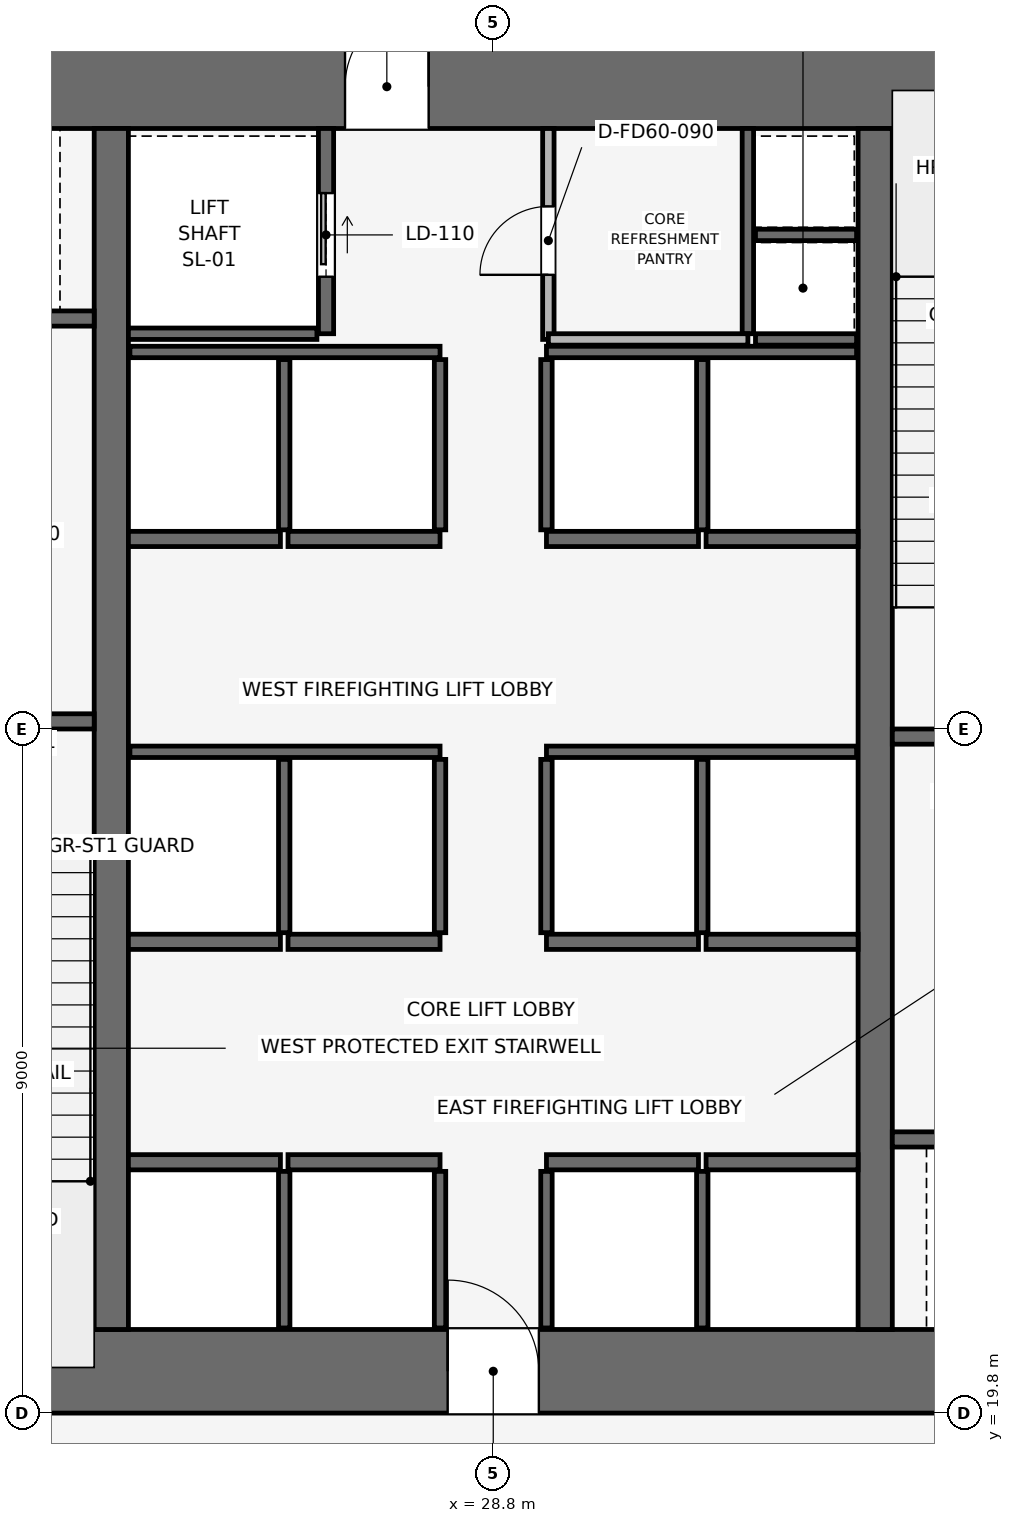
"""IFC4 building model, lengths in metres.
Left out: names, types, materials, properties, quantities, classifications, styles, units other than length and angle.
Written with IfcOpenShell. Run it as: python <this file> out.ifc"""

import sys

from ifc_helpers import new_model, si_unit, direction, frame, frame_2d, origin, place, context, subcontext, project, spatial, rectangle, extrude, element, fill, save


model = new_model("IFC4")
c1 = context("Model", 3, precision=1e-05, world=origin(), true_north=direction((0.0, 1.0)))
c2 = subcontext(c1, "Body", "Model", "MODEL_VIEW")
j1 = project(units=[si_unit("LENGTHUNIT", "METRE"), si_unit("PLANEANGLEUNIT", "RADIAN")], contexts=[c1])
p1 = place(None, origin())
s1 = spatial("IfcSite", under=j1, at=p1, CompositionType="ELEMENT")
p2 = place(p1, origin())
s2 = spatial("IfcBuilding", under=s1, at=p2, CompositionType="ELEMENT")
p3 = place(p2, frame((0.0, 0.0, 8.4)))
s3 = spatial("IfcBuildingStorey", under=s2, at=p3, CompositionType="ELEMENT", Elevation=8.4)
p4 = place(p3, frame((19.8, 20.35, 0.0), z_axis=(0.0, 0.0, 1.0), x_axis=(1.0, 0.0, 0.0)))
e1 = element("IfcWall", 1, at=p4, inside=s3, PredefinedType="SHEAR", context=c2, shape_type="SweptSolid", body=[
    extrude(rectangle(XDim=18.0, YDim=1.1, at=frame_2d((9.0, 0.0))), origin(), (0.0, 0.0, 1.0), 5.4),
])
p5 = place(p4, frame((8.4, 0.0, 0.0)))
e2 = element("IfcOpeningElement", 2, at=p5, cuts=e1, PredefinedType="OPENING", context=c2, shape_type="SweptSolid", body=[
    extrude(rectangle(XDim=1.2, YDim=2.2, at=frame_2d((0.6, 1.1))), frame((0.0, 0.56, 0.0), z_axis=(0.0, -1.0, 0.0), x_axis=(1.0, 0.0, 0.0)), (0.0, 0.0, 1.0), 1.12),
])
p6 = place(p3, frame((19.8, 37.25, 0.0), z_axis=(0.0, 0.0, 1.0), x_axis=(1.0, 0.0, 0.0)))
e3 = element("IfcWall", 3, at=p6, inside=s3, PredefinedType="SHEAR", context=c2, shape_type="SweptSolid", body=[
    extrude(rectangle(XDim=18.0, YDim=1.1, at=frame_2d((9.0, 0.0))), origin(), (0.0, 0.0, 1.0), 5.4),
])
p7 = place(p6, frame((7.05, 0.0, 0.0)))
e4 = element("IfcOpeningElement", 4, at=p7, cuts=e3, PredefinedType="OPENING", context=c2, shape_type="SweptSolid", body=[
    extrude(rectangle(XDim=1.1, YDim=2.15, at=frame_2d((0.55, 1.075))), frame((0.0, 0.56, 0.0), z_axis=(0.0, -1.0, 0.0), x_axis=(1.0, 0.0, 0.0)), (0.0, 0.0, 1.0), 1.12),
])
for number, where, z_axis, x_axis in (
    (5, (23.775, 20.9, 0.0), (0.0, 0.0, 1.0), (0.0, 1.0, 0.0)),
    (6, (33.825, 20.9, 0.0), (0.0, 0.0, 1.0), (0.0, 1.0, 0.0)),
):
    element("IfcWall", number, at=place(p3, frame(where, z_axis=z_axis, x_axis=x_axis)), inside=s3, PredefinedType="SHEAR", context=c2, shape_type="SweptSolid", body=[
        extrude(rectangle(XDim=15.8, YDim=0.45, at=frame_2d((7.9, 0.0))), origin(), (0.0, 0.0, 1.0), 5.4),
    ])
p8 = place(p3, frame((20.4, 28.9, 0.0), z_axis=(0.0, 0.0, 1.0), x_axis=(1.0, 0.0, 0.0)))
e7 = element("IfcWall", 7, at=p8, inside=s3, PredefinedType="SHEAR", context=c2, shape_type="SweptSolid", body=[
    extrude(rectangle(XDim=3.15, YDim=0.2, at=frame_2d((1.575, 0.0))), origin(), (0.0, 0.0, 1.0), 5.05),
])
p9 = place(p8, frame((0.8, 0.0, 0.0)))
e8 = element("IfcOpeningElement", 8, at=p9, cuts=e7, PredefinedType="OPENING", context=c2, shape_type="SweptSolid", body=[
    extrude(rectangle(XDim=1.0, YDim=2.1, at=frame_2d((0.5, 1.05))), frame((0.0, 0.11, 0.0), z_axis=(0.0, -1.0, 0.0), x_axis=(1.0, 0.0, 0.0)), (0.0, 0.0, 1.0), 0.22),
])
p10 = place(p3, frame((34.05, 28.7, 0.0), z_axis=(0.0, 0.0, 1.0), x_axis=(1.0, 0.0, 0.0)))
e9 = element("IfcWall", 9, at=p10, inside=s3, PredefinedType="SHEAR", context=c2, shape_type="SweptSolid", body=[
    extrude(rectangle(XDim=3.15, YDim=0.2, at=frame_2d((1.575, 0.0))), origin(), (0.0, 0.0, 1.0), 5.05),
])
p11 = place(p10, frame((0.8, 0.0, 0.0)))
e10 = element("IfcOpeningElement", 10, at=p11, cuts=e9, PredefinedType="OPENING", context=c2, shape_type="SweptSolid", body=[
    extrude(rectangle(XDim=1.0, YDim=2.1, at=frame_2d((0.5, 1.05))), frame((0.0, 0.11, 0.0), z_axis=(0.0, -1.0, 0.0), x_axis=(1.0, 0.0, 0.0)), (0.0, 0.0, 1.0), 0.22),
])
p12 = place(p3, frame((32.15, 34.0, 0.0), z_axis=(0.0, 0.0, 1.0), x_axis=(0.0, 1.0, 0.0)))
e11 = element("IfcWall", 11, at=p12, inside=s3, PredefinedType="SHEAR", context=c2, shape_type="SweptSolid", body=[
    extrude(rectangle(XDim=2.7, YDim=0.15, at=frame_2d((1.35, 0.0))), origin(), (0.0, 0.0, 1.0), 5.05),
])
for number, where, z_axis, x_axis in (
    (12, (32.25, 33.925, 0.0), (0.0, 0.0, 1.0), (1.0, 0.0, 0.0)),
    (13, (32.25, 35.3, 0.0), (0.0, 0.0, 1.0), (1.0, 0.0, 0.0)),
):
    element("IfcWall", number, at=place(p3, frame(where, z_axis=z_axis, x_axis=x_axis)), inside=s3, PredefinedType="SHEAR", context=c2, shape_type="SweptSolid", body=[
        extrude(rectangle(XDim=1.33, YDim=0.15, at=frame_2d((0.665, 0.0))), origin(), (0.0, 0.0, 1.0), 5.05),
    ])
p13 = place(p3, frame((20.5, 34.2, 0.0), z_axis=(0.0, 0.0, 1.0), x_axis=(1.0, 0.0, 0.0)))
e14 = element("IfcWall", 14, at=p13, inside=s3, PredefinedType="SHEAR", context=c2, shape_type="SweptSolid", body=[
    extrude(rectangle(XDim=3.05, YDim=0.2, at=frame_2d((1.525, 0.0))), origin(), (0.0, 0.0, 1.0), 5.05),
])
p14 = place(p13, frame((0.75, 0.0, 0.0)))
e15 = element("IfcOpeningElement", 15, at=p14, cuts=e14, PredefinedType="OPENING", context=c2, shape_type="SweptSolid", body=[
    extrude(rectangle(XDim=1.1, YDim=2.15, at=frame_2d((0.55, 1.075))), frame((0.0, 0.11, 0.0), z_axis=(0.0, -1.0, 0.0), x_axis=(1.0, 0.0, 0.0)), (0.0, 0.0, 1.0), 0.22),
])
p15 = place(p3, frame((34.05, 23.4, 0.0), z_axis=(0.0, 0.0, 1.0), x_axis=(1.0, 0.0, 0.0)))
e16 = element("IfcWall", 16, at=p15, inside=s3, PredefinedType="SHEAR", context=c2, shape_type="SweptSolid", body=[
    extrude(rectangle(XDim=3.05, YDim=0.2, at=frame_2d((1.525, 0.0))), origin(), (0.0, 0.0, 1.0), 5.05),
])
p16 = place(p15, frame((1.2, 0.0, 0.0)))
e17 = element("IfcOpeningElement", 17, at=p16, cuts=e16, PredefinedType="OPENING", context=c2, shape_type="SweptSolid", body=[
    extrude(rectangle(XDim=1.1, YDim=2.15, at=frame_2d((0.55, 1.075))), frame((0.0, 0.11, 0.0), z_axis=(0.0, -1.0, 0.0), x_axis=(1.0, 0.0, 0.0)), (0.0, 0.0, 1.0), 0.22),
])
p17 = place(p3, frame((26.6, 34.0, 0.0), z_axis=(0.0, 0.0, 1.0), x_axis=(0.0, 1.0, 0.0)))
e18 = element("IfcWall", 18, at=p17, inside=s3, PredefinedType="SHEAR", context=c2, shape_type="SweptSolid", body=[
    extrude(rectangle(XDim=2.7, YDim=0.2, at=frame_2d((1.35, 0.0))), origin(), (0.0, 0.0, 1.0), 5.05),
])
p18 = place(p17, frame((0.75, 0.0, 0.0)))
e19 = element("IfcOpeningElement", 19, at=p18, cuts=e18, PredefinedType="OPENING", context=c2, shape_type="SweptSolid", body=[
    extrude(rectangle(XDim=1.1, YDim=2.15, at=frame_2d((0.55, 1.075))), frame((0.0, 0.11, 0.0), z_axis=(0.0, -1.0, 0.0), x_axis=(1.0, 0.0, 0.0)), (0.0, 0.0, 1.0), 0.22),
])
p19 = place(p3, frame((24.0, 34.0, 0.0), z_axis=(0.0, 0.0, 1.0), x_axis=(1.0, 0.0, 0.0)))
e20 = element("IfcWall", 20, at=p19, inside=s3, PredefinedType="SHEAR", context=c2, shape_type="SweptSolid", body=[
    extrude(rectangle(XDim=2.48, YDim=0.15, at=frame_2d((1.24, 0.0))), origin(), (0.0, 0.0, 1.0), 5.05),
])
for number, where, z_axis, x_axis in (
    (21, (24.0, 23.1, 0.0), (0.0, 0.0, 1.0), (1.0, 0.0, 0.0)),
    (22, (26.1, 23.1, 0.0), (0.0, 0.0, 1.0), (1.0, 0.0, 0.0)),
    (23, (29.5, 23.1, 0.0), (0.0, 0.0, 1.0), (1.0, 0.0, 0.0)),
    (24, (31.6, 23.1, 0.0), (0.0, 0.0, 1.0), (1.0, 0.0, 0.0)),
    (25, (24.0, 26.0, 0.0), (0.0, 0.0, 1.0), (1.0, 0.0, 0.0)),
    (26, (26.1, 26.0, 0.0), (0.0, 0.0, 1.0), (1.0, 0.0, 0.0)),
    (27, (29.5, 26.0, 0.0), (0.0, 0.0, 1.0), (1.0, 0.0, 0.0)),
    (28, (31.6, 26.0, 0.0), (0.0, 0.0, 1.0), (1.0, 0.0, 0.0)),
    (29, (24.0, 31.3, 0.0), (0.0, 0.0, 1.0), (1.0, 0.0, 0.0)),
    (30, (26.1, 31.3, 0.0), (0.0, 0.0, 1.0), (1.0, 0.0, 0.0)),
    (31, (29.5, 31.3, 0.0), (0.0, 0.0, 1.0), (1.0, 0.0, 0.0)),
    (32, (31.6, 31.3, 0.0), (0.0, 0.0, 1.0), (1.0, 0.0, 0.0)),
):
    element("IfcWall", number, at=place(p3, frame(where, z_axis=z_axis, x_axis=x_axis)), inside=s3, PredefinedType="SHEAR", context=c2, shape_type="SweptSolid", body=[
        extrude(rectangle(XDim=2.0, YDim=0.2, at=frame_2d((1.0, 0.0))), origin(), (0.0, 0.0, 1.0), 5.05),
    ])
for number, where, z_axis, x_axis in (
    (33, (26.05, 20.92, 0.0), (0.0, 0.0, 1.0), (0.0, 1.0, 0.0)),
    (34, (28.1, 20.92, 0.0), (0.0, 0.0, 1.0), (0.0, 1.0, 0.0)),
    (35, (29.5, 20.92, 0.0), (0.0, 0.0, 1.0), (0.0, 1.0, 0.0)),
    (36, (31.55, 20.92, 0.0), (0.0, 0.0, 1.0), (0.0, 1.0, 0.0)),
):
    element("IfcWall", number, at=place(p3, frame(where, z_axis=z_axis, x_axis=x_axis)), inside=s3, PredefinedType="SHEAR", context=c2, shape_type="SweptSolid", body=[
        extrude(rectangle(XDim=2.06, YDim=0.15, at=frame_2d((1.03, 0.0))), origin(), (0.0, 0.0, 1.0), 5.05),
    ])
for number, where, z_axis, x_axis in (
    (37, (24.02, 28.5, 0.0), (0.0, 0.0, 1.0), (1.0, 0.0, 0.0)),
    (38, (29.5, 28.5, 0.0), (0.0, 0.0, 1.0), (1.0, 0.0, 0.0)),
):
    element("IfcWall", number, at=place(p3, frame(where, z_axis=z_axis, x_axis=x_axis)), inside=s3, PredefinedType="SHEAR", context=c2, shape_type="SweptSolid", body=[
        extrude(rectangle(XDim=4.08, YDim=0.15, at=frame_2d((2.04, 0.0))), origin(), (0.0, 0.0, 1.0), 5.05),
    ])
for number, where, z_axis, x_axis in (
    (39, (26.05, 26.12, 0.0), (0.0, 0.0, 1.0), (0.0, 1.0, 0.0)),
    (40, (28.1, 26.12, 0.0), (0.0, 0.0, 1.0), (0.0, 1.0, 0.0)),
    (41, (29.5, 26.12, 0.0), (0.0, 0.0, 1.0), (0.0, 1.0, 0.0)),
    (42, (31.55, 26.12, 0.0), (0.0, 0.0, 1.0), (0.0, 1.0, 0.0)),
):
    element("IfcWall", number, at=place(p3, frame(where, z_axis=z_axis, x_axis=x_axis)), inside=s3, PredefinedType="SHEAR", context=c2, shape_type="SweptSolid", body=[
        extrude(rectangle(XDim=2.28, YDim=0.15, at=frame_2d((1.14, 0.0))), origin(), (0.0, 0.0, 1.0), 5.05),
    ])
for number, where, z_axis, x_axis in (
    (43, (24.02, 33.76, 0.0), (0.0, 0.0, 1.0), (1.0, 0.0, 0.0)),
    (44, (29.5, 33.76, 0.0), (0.0, 0.0, 1.0), (1.0, 0.0, 0.0)),
):
    element("IfcWall", number, at=place(p3, frame(where, z_axis=z_axis, x_axis=x_axis)), inside=s3, PredefinedType="SHEAR", context=c2, shape_type="SweptSolid", body=[
        extrude(rectangle(XDim=4.08, YDim=0.15, at=frame_2d((2.04, 0.0))), origin(), (0.0, 0.0, 1.0), 5.05),
    ])
for number, where, z_axis, x_axis in (
    (45, (26.05, 31.42, 0.0), (0.0, 0.0, 1.0), (0.0, 1.0, 0.0)),
    (46, (28.1, 31.42, 0.0), (0.0, 0.0, 1.0), (0.0, 1.0, 0.0)),
    (47, (29.5, 31.42, 0.0), (0.0, 0.0, 1.0), (0.0, 1.0, 0.0)),
    (48, (31.55, 31.42, 0.0), (0.0, 0.0, 1.0), (0.0, 1.0, 0.0)),
):
    element("IfcWall", number, at=place(p3, frame(where, z_axis=z_axis, x_axis=x_axis)), inside=s3, PredefinedType="SHEAR", context=c2, shape_type="SweptSolid", body=[
        extrude(rectangle(XDim=2.24, YDim=0.15, at=frame_2d((1.12, 0.0))), origin(), (0.0, 0.0, 1.0), 5.05),
    ])
p20 = place(p3, frame((29.525, 33.925, 0.0), z_axis=(0.0, 0.0, 1.0), x_axis=(0.0, 1.0, 0.0)))
e49 = element("IfcWall", 49, at=p20, inside=s3, PredefinedType="PARTITIONING", context=c2, shape_type="SweptSolid", body=[
    extrude(rectangle(XDim=2.775, YDim=0.15, at=frame_2d((1.387, 0.0))), origin(), (0.0, 0.0, 1.0), 5.05),
])
p21 = place(p20, frame((0.85, 0.0, 0.0)))
e50 = element("IfcOpeningElement", 50, at=p21, cuts=e49, PredefinedType="OPENING", context=c2, shape_type="SweptSolid", body=[
    extrude(rectangle(XDim=0.9, YDim=2.1, at=frame_2d((0.45, 1.05))), frame((0.0, 0.085, 0.0), z_axis=(0.0, -1.0, 0.0), x_axis=(1.0, 0.0, 0.0)), (0.0, 0.0, 1.0), 0.17),
])
p22 = place(p3, frame((29.525, 33.925, 0.0), z_axis=(0.0, 0.0, 1.0), x_axis=(1.0, 0.0, 0.0)))
e51 = element("IfcWall", 51, at=p22, inside=s3, PredefinedType="PARTITIONING", context=c2, shape_type="SweptSolid", body=[
    extrude(rectangle(XDim=2.625, YDim=0.15, at=frame_2d((1.312, 0.0))), origin(), (0.0, 0.0, 1.0), 5.05),
])
p23 = place(p18, origin())
e52 = element("IfcDoor", 52, at=p23, inside=s3, OperationType="SLIDING_TO_RIGHT", PredefinedType="DOOR", context=c2, shape_type="SweptSolid", body=[
    extrude(rectangle(XDim=1.1, YDim=2.15, at=frame_2d((0.55, 1.075))), frame((0.0, 0.025, 0.0), z_axis=(0.0, -1.0, 0.0), x_axis=(1.0, 0.0, 0.0)), (0.0, 0.0, 1.0), 0.05),
])
fill(e19, e52)
p24 = place(p21, origin())
e53 = element("IfcDoor", 53, at=p24, inside=s3, OperationType="SINGLE_SWING_LEFT", PredefinedType="DOOR", context=c2, shape_type="SweptSolid", body=[
    extrude(rectangle(XDim=0.9, YDim=2.1, at=frame_2d((0.45, 1.05))), frame((0.0, 0.025, 0.0), z_axis=(0.0, -1.0, 0.0), x_axis=(1.0, 0.0, 0.0)), (0.0, 0.0, 1.0), 0.05),
])
fill(e50, e53)
p25 = place(p5, origin())
e54 = element("IfcDoor", 54, at=p25, inside=s3, OperationType="SINGLE_SWING_LEFT", PredefinedType="DOOR", context=c2, shape_type="SweptSolid", body=[
    extrude(rectangle(XDim=1.2, YDim=2.2, at=frame_2d((0.6, 1.1))), frame((0.0, 0.025, 0.0), z_axis=(0.0, -1.0, 0.0), x_axis=(1.0, 0.0, 0.0)), (0.0, 0.0, 1.0), 0.05),
])
fill(e2, e54)
p26 = place(p7, origin())
e55 = element("IfcDoor", 55, at=p26, inside=s3, OperationType="SINGLE_SWING_RIGHT", PredefinedType="DOOR", context=c2, shape_type="SweptSolid", body=[
    extrude(rectangle(XDim=1.1, YDim=2.15, at=frame_2d((0.55, 1.075))), frame((0.0, 0.025, 0.0), z_axis=(0.0, -1.0, 0.0), x_axis=(1.0, 0.0, 0.0)), (0.0, 0.0, 1.0), 0.05),
])
fill(e4, e55)
save(model, sys.argv[1])
